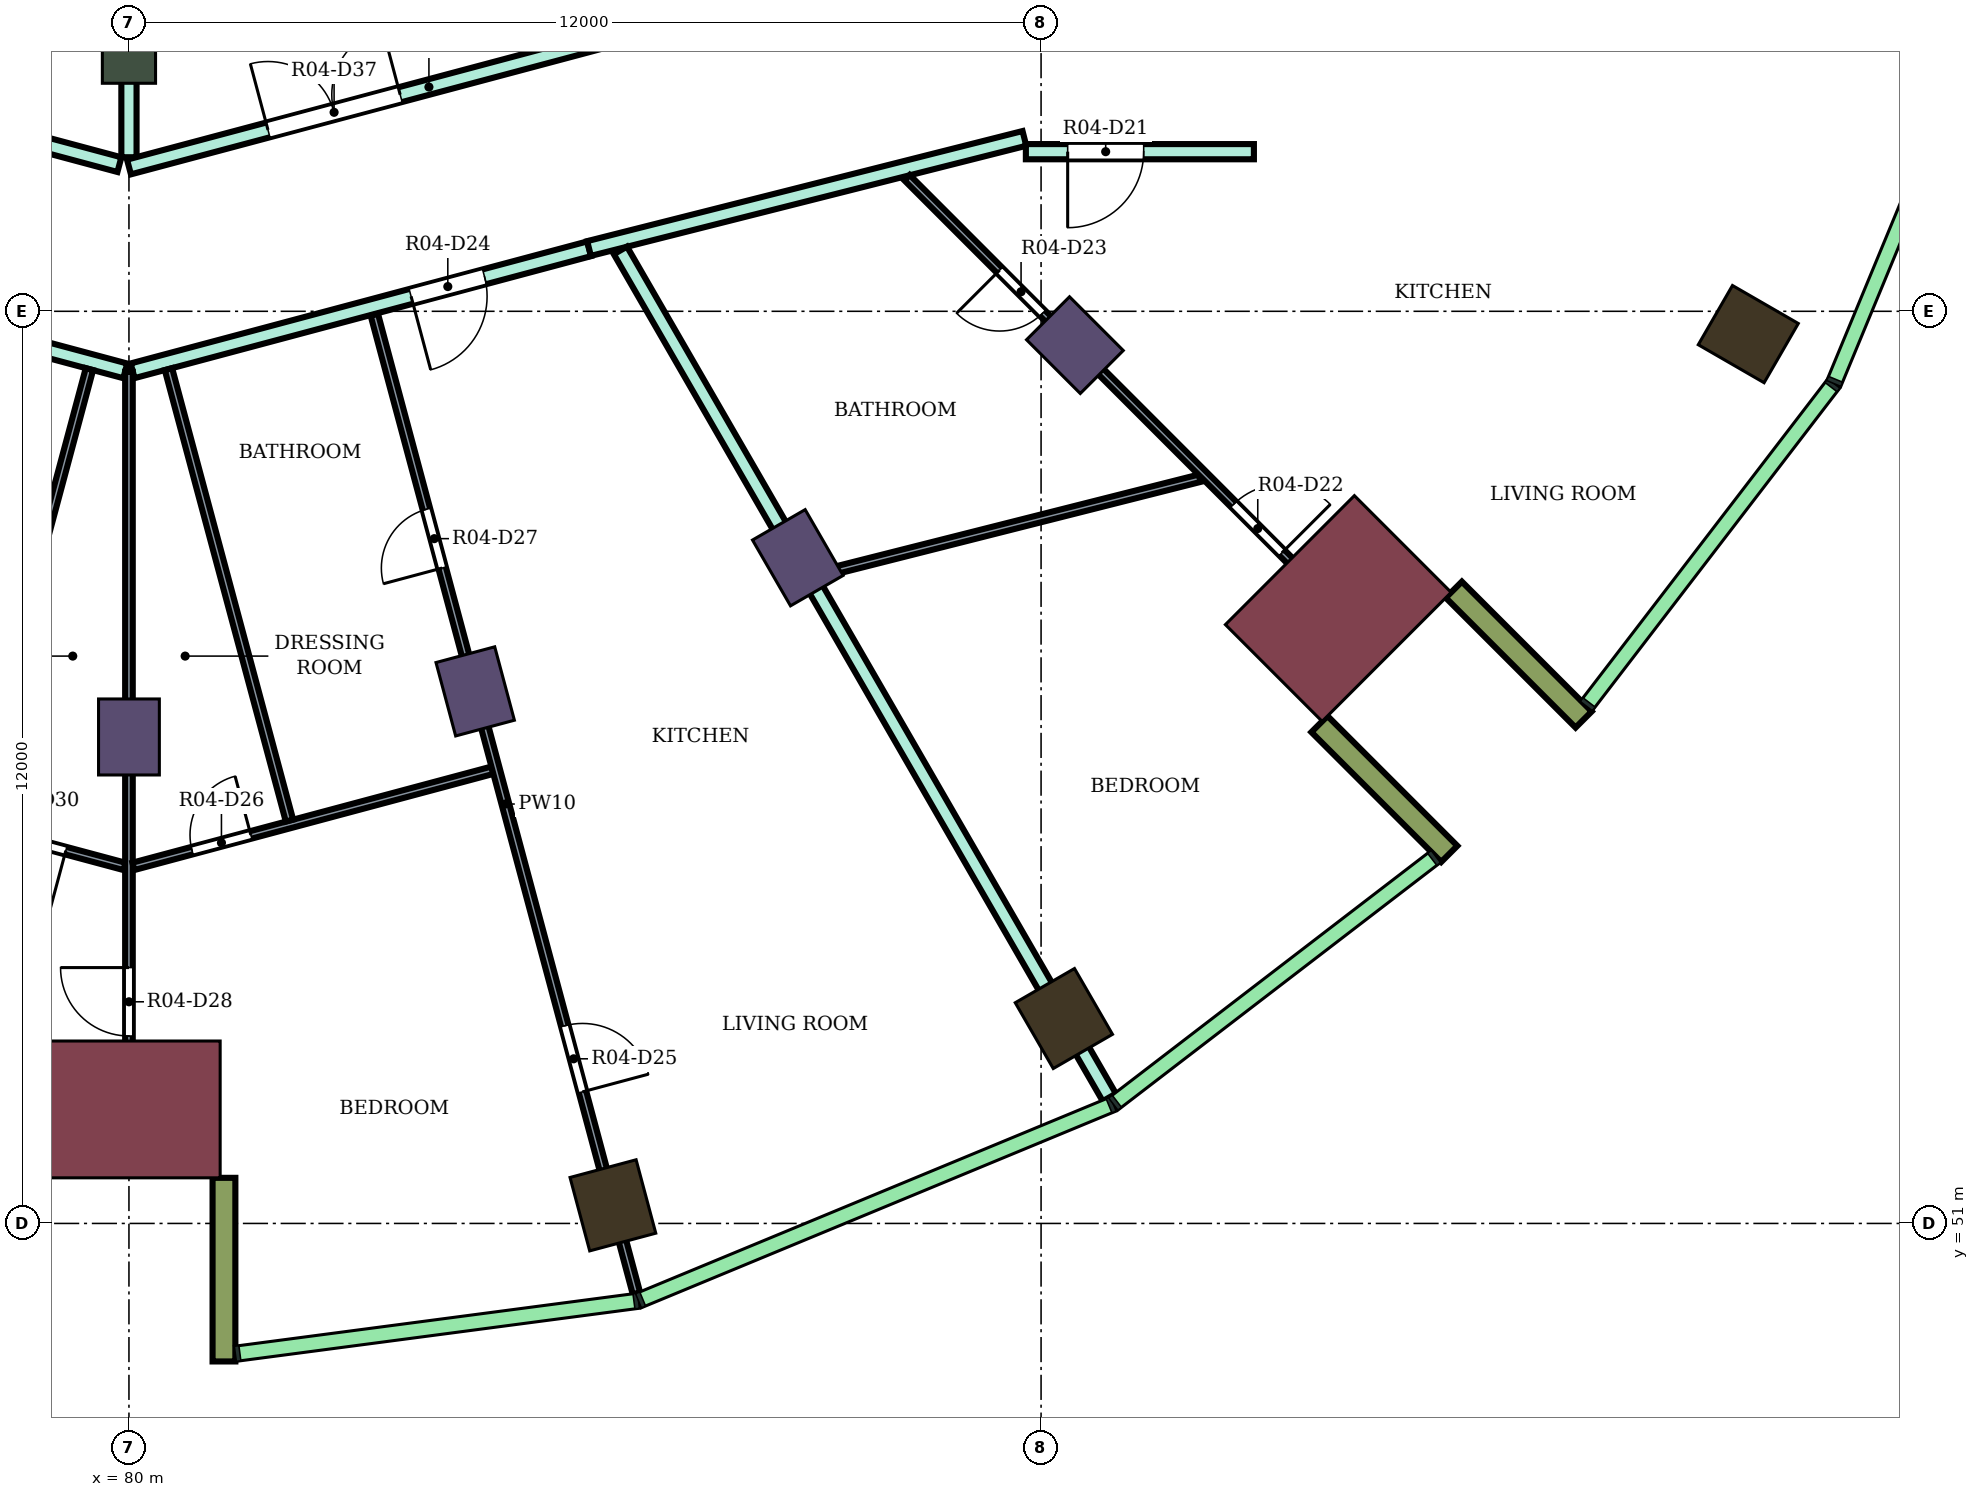
"""IFC4 building model, lengths in metres.
Left out: names, types, materials, properties, quantities, classifications, styles, units other than length and angle.
Written with IfcOpenShell. Run it as: python <this file> out.ifc"""

import sys

from ifc_helpers import new_model, si_unit, direction, frame, frame_2d, origin, origin_2d, place, context, subcontext, project, spatial, rectangle, extrude, element, fill, save


model = new_model("IFC4")
c1 = context("Model", 3, precision=1e-05, world=origin(), true_north=direction((0.0, 1.0)))
c2 = subcontext(c1, "Body", "Model", "MODEL_VIEW")
j1 = project(units=[si_unit("LENGTHUNIT", "METRE"), si_unit("PLANEANGLEUNIT", "RADIAN")], contexts=[c1])
p1 = place(None, origin())
s1 = spatial("IfcSite", under=j1, at=p1, CompositionType="ELEMENT")
p2 = place(p1, origin())
s2 = spatial("IfcBuilding", under=s1, at=p2, CompositionType="ELEMENT")
p3 = place(p2, frame((0.0, 0.0, 202.8)))
s3 = spatial("IfcBuildingStorey", under=s2, at=p3, CompositionType="ELEMENT", Elevation=202.8)
for number, where, z_axis, x_axis in (
    (1, (86.367, 51.238, 0.0), (0.0, 0.0, 1.0), (0.259, -0.966, 0.0)),
    (2, (92.3, 53.696, 0.0), (0.0, 0.0, 1.0), (0.5, -0.866, 0.0)),
    (3, (101.304, 62.7, 0.0), (0.0, 0.0, 1.0), (0.866, -0.5, 0.0)),
):
    element("IfcColumn", number, at=place(p3, frame(where, z_axis=z_axis, x_axis=x_axis)), inside=s3, PredefinedType="COLUMN", context=c2, shape_type="SweptSolid", body=[
        extrude(rectangle(XDim=1.0, YDim=0.9, at=origin_2d()), origin(), (0.0, 0.0, 1.0), 4.1),
    ])
for number, where, z_axis, x_axis in (
    (4, (80.0, 57.4, 0.0), (0.0, 0.0, 1.0), (0.0, -1.0, 0.0)),
    (5, (84.555, 58.0, 0.0), (0.0, 0.0, 1.0), (0.259, -0.966, 0.0)),
    (6, (88.8, 59.758, 0.0), (0.0, 0.0, 1.0), (0.5, -0.866, 0.0)),
    (7, (92.445, 62.555, 0.0), (0.0, 0.0, 1.0), (0.707, -0.707, 0.0)),
):
    element("IfcColumn", number, at=place(p3, frame(where, z_axis=z_axis, x_axis=x_axis)), inside=s3, PredefinedType="COLUMN", context=c2, shape_type="SweptSolid", body=[
        extrude(rectangle(XDim=1.0, YDim=0.8, at=origin_2d()), origin(), (0.0, 0.0, 1.0), 4.1),
    ])
p4 = place(p3, frame((80.0, 66.4, 0.0), z_axis=(0.0, 0.0, 1.0), x_axis=(0.0, -1.0, 0.0)))
e8 = element("IfcColumn", 8, at=p4, inside=s3, PredefinedType="COLUMN", context=c2, shape_type="SweptSolid", body=[
    extrude(rectangle(XDim=0.8, YDim=0.7, at=origin_2d()), origin(), (0.0, 0.0, 1.0), 4.1),
])
for number, where, z_axis, x_axis in (
    (9, (80.0, 52.5, 0.0), (0.0, 0.0, 1.0), (0.0, -1.0, 0.0)),
    (10, (95.91, 59.09, 0.0), (0.0, 0.0, 1.0), (0.707, -0.707, 0.0)),
):
    element("IfcColumn", number, at=place(p3, frame(where, z_axis=z_axis, x_axis=x_axis)), inside=s3, PredefinedType="COLUMN", context=c2, shape_type="SweptSolid", body=[
        extrude(rectangle(XDim=1.8, YDim=2.4, at=origin_2d()), origin(), (0.0, 0.0, 1.0), 4.1),
    ])
for number, where, z_axis, x_axis in (
    (11, (81.25, 51.6, 0.0), (0.0, 0.0, 1.0), (0.0, -1.0, 0.0)),
    (12, (95.662, 57.57, 0.0), (0.0, 0.0, 1.0), (0.707, -0.707, 0.0)),
    (13, (97.43, 59.338, 0.0), (0.0, 0.0, 1.0), (0.707, -0.707, 0.0)),
):
    element("IfcWall", number, at=place(p3, frame(where, z_axis=z_axis, x_axis=x_axis)), inside=s3, PredefinedType="NOTDEFINED", context=c2, shape_type="SweptSolid", body=[
        extrude(rectangle(XDim=2.416, YDim=0.3, at=frame_2d((1.208, 0.0))), origin(), (0.0, 0.0, 1.0), 4.1),
    ])
p5 = place(p3, frame((73.947, 63.826, 0.0), z_axis=(0.0, 0.0, 1.0), x_axis=(0.965908253407, -0.258884619088, 0.0)))
e14 = element("IfcWall", 14, at=p5, inside=s3, PredefinedType="PARTITIONING", context=c2, shape_type="SweptSolid", body=[
    extrude(rectangle(XDim=6.217, YDim=0.2, at=frame_2d((3.108, 0.0))), origin(), (0.0, 0.0, 1.0), 3.65),
])
p6 = place(p5, frame((1.424, 0.0, 0.0)))
e15 = element("IfcOpeningElement", 15, at=p6, cuts=e14, PredefinedType="OPENING", context=c2, shape_type="SweptSolid", body=[
    extrude(rectangle(XDim=1.0, YDim=2.1, at=frame_2d((0.5, 1.05))), frame((0.0, 0.11, 0.0), z_axis=(0.0, -1.0, 0.0), x_axis=(1.0, 0.0, 0.0)), (0.0, 0.0, 1.0), 0.22),
])
p7 = place(p3, frame((74.603, 66.342, 0.0), z_axis=(0.0, 0.0, 1.0), x_axis=(0.965920893652, -0.258837453254, 0.0)))
e16 = element("IfcWall", 16, at=p7, inside=s3, PredefinedType="PARTITIONING", context=c2, shape_type="SweptSolid", body=[
    extrude(rectangle(XDim=5.458, YDim=0.2, at=frame_2d((2.729, 0.0))), origin(), (0.0, 0.0, 1.0), 3.65),
])
p8 = place(p7, frame((2.512, 0.0, 0.0)))
e17 = element("IfcOpeningElement", 17, at=p8, cuts=e16, PredefinedType="OPENING", context=c2, shape_type="SweptSolid", body=[
    extrude(rectangle(XDim=0.9, YDim=2.1, at=frame_2d((0.45, 1.05))), frame((0.0, 0.11, 0.0), z_axis=(0.0, -1.0, 0.0), x_axis=(1.0, 0.0, 0.0)), (0.0, 0.0, 1.0), 0.22),
])
p9 = place(p3, frame((80.048, 62.217, 0.0), z_axis=(0.0, 0.0, 1.0), x_axis=(0.966097920642, 0.258175923996, 0.0)))
e18 = element("IfcWall", 18, at=p9, inside=s3, PredefinedType="PARTITIONING", context=c2, shape_type="SweptSolid", body=[
    extrude(rectangle(XDim=6.217, YDim=0.2, at=frame_2d((3.108, 0.0))), origin(), (0.0, 0.0, 1.0), 3.65),
])
p10 = place(p9, frame((3.792, 0.0, 0.0)))
e19 = element("IfcOpeningElement", 19, at=p10, cuts=e18, PredefinedType="OPENING", context=c2, shape_type="SweptSolid", body=[
    extrude(rectangle(XDim=1.0, YDim=2.1, at=frame_2d((0.5, 1.05))), frame((0.0, 0.11, 0.0), z_axis=(0.0, -1.0, 0.0), x_axis=(1.0, 0.0, 0.0)), (0.0, 0.0, 1.0), 0.22),
])
p11 = place(p3, frame((80.0, 65.027, 0.0), z_axis=(0.0, 0.0, 1.0), x_axis=(0.0, 1.0, 0.0)))
e20 = element("IfcWall", 20, at=p11, inside=s3, PredefinedType="PARTITIONING", context=c2, shape_type="SweptSolid", body=[
    extrude(rectangle(XDim=2.273, YDim=0.2, at=frame_2d((1.136, 0.0))), origin(), (0.0, 0.0, 1.0), 3.65),
])
p12 = place(p3, frame((80.0, 64.898, 0.0), z_axis=(0.0, 0.0, 1.0), x_axis=(0.966236923997, 0.25765520896, 0.0)))
e21 = element("IfcWall", 21, at=p12, inside=s3, PredefinedType="PARTITIONING", context=c2, shape_type="SweptSolid", body=[
    extrude(rectangle(XDim=8.168, YDim=0.2, at=frame_2d((4.084, 0.0))), origin(), (0.0, 0.0, 1.0), 3.65),
])
p13 = place(p12, frame((1.893, 0.0, 0.0)))
e22 = element("IfcOpeningElement", 22, at=p13, cuts=e21, PredefinedType="OPENING", context=c2, shape_type="SweptSolid", body=[
    extrude(rectangle(XDim=1.8, YDim=2.1, at=frame_2d((0.9, 1.05))), frame((0.0, 0.11, 0.0), z_axis=(0.0, -1.0, 0.0), x_axis=(1.0, 0.0, 0.0)), (0.0, 0.0, 1.0), 0.22),
])
p14 = place(p3, frame((86.053, 63.826, 0.0), z_axis=(0.0, 0.0, 1.0), x_axis=(0.969490004987, 0.245130843083, 0.0)))
e23 = element("IfcWall", 23, at=p14, inside=s3, PredefinedType="PARTITIONING", context=c2, shape_type="SweptSolid", body=[
    extrude(rectangle(XDim=5.908, YDim=0.2, at=frame_2d((2.954, 0.0))), origin(), (0.0, 0.0, 1.0), 3.65),
])
p15 = place(p3, frame((86.466, 63.801, 0.0), z_axis=(0.0, 0.0, 1.0), x_axis=(0.499937082171, -0.866061726362, 0.0)))
e24 = element("IfcWall", 24, at=p15, inside=s3, PredefinedType="PARTITIONING", context=c2, shape_type="SweptSolid", body=[
    extrude(rectangle(XDim=12.866, YDim=0.2, at=frame_2d((6.433, 0.0))), origin(), (0.0, 0.0, 1.0), 3.65),
])
p16 = place(p3, frame((91.8, 65.1, 0.0), z_axis=(0.0, 0.0, 1.0), x_axis=(1.0, 0.0, 0.0)))
e25 = element("IfcWall", 25, at=p16, inside=s3, PredefinedType="PARTITIONING", context=c2, shape_type="SweptSolid", body=[
    extrude(rectangle(XDim=3.0, YDim=0.2, at=frame_2d((1.5, 0.0))), origin(), (0.0, 0.0, 1.0), 3.65),
])
p17 = place(p16, frame((0.55, 0.0, 0.0)))
e26 = element("IfcOpeningElement", 26, at=p17, cuts=e25, PredefinedType="OPENING", context=c2, shape_type="SweptSolid", body=[
    extrude(rectangle(XDim=1.0, YDim=2.1, at=frame_2d((0.5, 1.05))), frame((0.0, 0.11, 0.0), z_axis=(0.0, -1.0, 0.0), x_axis=(1.0, 0.0, 0.0)), (0.0, 0.0, 1.0), 0.22),
])
p18 = place(p3, frame((75.267, 56.95, 0.0), z_axis=(0.0, 0.0, 1.0), x_axis=(0.965900084933, -0.25891509405, 0.0)))
e27 = element("IfcWall", 27, at=p18, inside=s3, PredefinedType="PARTITIONING", context=c2, shape_type="SweptSolid", body=[
    extrude(rectangle(XDim=4.84, YDim=0.1, at=frame_2d((2.42, 0.0))), origin(), (0.0, 0.0, 1.0), 3.65),
])
p19 = place(p18, frame((0.91, 0.0, 0.0)))
e28 = element("IfcOpeningElement", 28, at=p19, cuts=e27, PredefinedType="OPENING", context=c2, shape_type="SweptSolid", body=[
    extrude(rectangle(XDim=0.8, YDim=2.1, at=frame_2d((0.4, 1.05))), frame((0.0, 0.06, 0.0), z_axis=(0.0, -1.0, 0.0), x_axis=(1.0, 0.0, 0.0)), (0.0, 0.0, 1.0), 0.12),
])
p20 = place(p18, frame((3.24, 0.0, 0.0)))
e29 = element("IfcOpeningElement", 29, at=p20, cuts=e27, PredefinedType="OPENING", context=c2, shape_type="SweptSolid", body=[
    extrude(rectangle(XDim=0.8, YDim=2.1, at=frame_2d((0.4, 1.05))), frame((0.0, 0.06, 0.0), z_axis=(0.0, -1.0, 0.0), x_axis=(1.0, 0.0, 0.0)), (0.0, 0.0, 1.0), 0.12),
])
p21 = place(p3, frame((77.888, 56.3, 0.0), z_axis=(0.0, 0.0, 1.0), x_axis=(0.258885575383, 0.965907997098, 0.0)))
e30 = element("IfcWall", 30, at=p21, inside=s3, PredefinedType="PARTITIONING", context=c2, shape_type="SweptSolid", body=[
    extrude(rectangle(XDim=6.15, YDim=0.1, at=frame_2d((3.075, 0.0))), origin(), (0.0, 0.0, 1.0), 3.65),
])
p22 = place(p3, frame((80.0, 51.8, 0.0), z_axis=(0.0, 0.0, 1.0), x_axis=(0.0, 1.0, 0.0)))
e31 = element("IfcWall", 31, at=p22, inside=s3, PredefinedType="PARTITIONING", context=c2, shape_type="SweptSolid", body=[
    extrude(rectangle(XDim=10.404, YDim=0.1, at=frame_2d((5.202, 0.0))), origin(), (0.0, 0.0, 1.0), 3.65),
])
p23 = place(p22, frame((1.666, 0.0, 0.0)))
e32 = element("IfcOpeningElement", 32, at=p23, cuts=e31, PredefinedType="OPENING", context=c2, shape_type="SweptSolid", body=[
    extrude(rectangle(XDim=0.9, YDim=2.1, at=frame_2d((0.45, 1.05))), frame((0.0, 0.06, 0.0), z_axis=(0.0, -1.0, 0.0), x_axis=(1.0, 0.0, 0.0)), (0.0, 0.0, 1.0), 0.12),
])
p24 = place(p3, frame((80.058, 55.698, 0.0), z_axis=(0.0, 0.0, 1.0), x_axis=(0.965970105839, 0.258653734992, 0.0)))
e33 = element("IfcWall", 33, at=p24, inside=s3, PredefinedType="PARTITIONING", context=c2, shape_type="SweptSolid", body=[
    extrude(rectangle(XDim=4.89, YDim=0.1, at=frame_2d((2.445, 0.0))), origin(), (0.0, 0.0, 1.0), 3.65),
])
p25 = place(p24, frame((0.8, 0.0, 0.0)))
e34 = element("IfcOpeningElement", 34, at=p25, cuts=e33, PredefinedType="OPENING", context=c2, shape_type="SweptSolid", body=[
    extrude(rectangle(XDim=0.8, YDim=2.1, at=frame_2d((0.4, 1.05))), frame((0.0, 0.06, 0.0), z_axis=(0.0, -1.0, 0.0), x_axis=(1.0, 0.0, 0.0)), (0.0, 0.0, 1.0), 0.12),
])
p26 = place(p3, frame((80.52, 62.24, 0.0), z_axis=(0.0, 0.0, 1.0), x_axis=(0.258885575383, -0.965907997098, 0.0)))
e35 = element("IfcWall", 35, at=p26, inside=s3, PredefinedType="PARTITIONING", context=c2, shape_type="SweptSolid", body=[
    extrude(rectangle(XDim=6.15, YDim=0.1, at=frame_2d((3.075, 0.0))), origin(), (0.0, 0.0, 1.0), 3.65),
])
p27 = place(p3, frame((83.228, 62.955, 0.0), z_axis=(0.0, 0.0, 1.0), x_axis=(0.258737611245, -0.965947642746, 0.0)))
e36 = element("IfcWall", 36, at=p27, inside=s3, PredefinedType="PARTITIONING", context=c2, shape_type="SweptSolid", body=[
    extrude(rectangle(XDim=13.328, YDim=0.1, at=frame_2d((6.664, 0.0))), origin(), (0.0, 0.0, 1.0), 3.65),
])
p28 = place(p27, frame((9.684, 0.0, 0.0)))
e37 = element("IfcOpeningElement", 37, at=p28, cuts=e36, PredefinedType="OPENING", context=c2, shape_type="SweptSolid", body=[
    extrude(rectangle(XDim=0.9, YDim=2.1, at=frame_2d((0.45, 1.05))), frame((0.0, 0.06, 0.0), z_axis=(0.0, -1.0, 0.0), x_axis=(1.0, 0.0, 0.0)), (0.0, 0.0, 1.0), 0.12),
])
p29 = place(p27, frame((2.65, 0.0, 0.0)))
e38 = element("IfcOpeningElement", 38, at=p29, cuts=e36, PredefinedType="OPENING", context=c2, shape_type="SweptSolid", body=[
    extrude(rectangle(XDim=0.8, YDim=2.1, at=frame_2d((0.4, 1.05))), frame((0.0, 0.06, 0.0), z_axis=(0.0, -1.0, 0.0), x_axis=(1.0, 0.0, 0.0)), (0.0, 0.0, 1.0), 0.12),
])
p30 = place(p3, frame((89.054, 59.531, 0.0), z_axis=(0.0, 0.0, 1.0), x_axis=(0.969472150829, 0.245201445279, 0.0)))
e39 = element("IfcWall", 39, at=p30, inside=s3, PredefinedType="PARTITIONING", context=c2, shape_type="SweptSolid", body=[
    extrude(rectangle(XDim=5.191, YDim=0.1, at=frame_2d((2.596, 0.0))), origin(), (0.0, 0.0, 1.0), 3.65),
])
p31 = place(p3, frame((90.236, 64.758, 0.0), z_axis=(0.0, 0.0, 1.0), x_axis=(0.706952774706, -0.707260754132, 0.0)))
e40 = element("IfcWall", 40, at=p31, inside=s3, PredefinedType="PARTITIONING", context=c2, shape_type="SweptSolid", body=[
    extrude(rectangle(XDim=8.72, YDim=0.1, at=frame_2d((4.36, 0.0))), origin(), (0.0, 0.0, 1.0), 3.65),
])
p32 = place(p31, frame((6.077, 0.0, 0.0)))
e41 = element("IfcOpeningElement", 41, at=p32, cuts=e40, PredefinedType="OPENING", context=c2, shape_type="SweptSolid", body=[
    extrude(rectangle(XDim=0.9, YDim=2.1, at=frame_2d((0.45, 1.05))), frame((0.0, 0.06, 0.0), z_axis=(0.0, -1.0, 0.0), x_axis=(1.0, 0.0, 0.0)), (0.0, 0.0, 1.0), 0.12),
])
p33 = place(p31, frame((1.722, 0.0, 0.0)))
e42 = element("IfcOpeningElement", 42, at=p33, cuts=e40, PredefinedType="OPENING", context=c2, shape_type="SweptSolid", body=[
    extrude(rectangle(XDim=0.8, YDim=2.1, at=frame_2d((0.4, 1.05))), frame((0.0, 0.06, 0.0), z_axis=(0.0, -1.0, 0.0), x_axis=(1.0, 0.0, 0.0)), (0.0, 0.0, 1.0), 0.12),
])
p34 = place(p17, frame((1.0, 0.0, 0.0), z_axis=(0.0, 0.0, 1.0), x_axis=(-1.0, 0.0, 0.0)))
e43 = element("IfcDoor", 43, at=p34, inside=s3, OperationType="SINGLE_SWING_RIGHT", PredefinedType="DOOR", context=c2, shape_type="SweptSolid", body=[
    extrude(rectangle(XDim=1.0, YDim=2.1, at=frame_2d((0.5, 1.05))), frame((0.0, 0.025, 0.0), z_axis=(0.0, -1.0, 0.0), x_axis=(1.0, 0.0, 0.0)), (0.0, 0.0, 1.0), 0.05),
])
fill(e26, e43)
p35 = place(p32, origin())
e44 = element("IfcDoor", 44, at=p35, inside=s3, OperationType="SINGLE_SWING_RIGHT", PredefinedType="DOOR", context=c2, shape_type="SweptSolid", body=[
    extrude(rectangle(XDim=0.9, YDim=2.1, at=frame_2d((0.45, 1.05))), frame((0.0, 0.025, 0.0), z_axis=(0.0, -1.0, 0.0), x_axis=(1.0, 0.0, 0.0)), (0.0, 0.0, 1.0), 0.05),
])
fill(e41, e44)
p36 = place(p33, frame((0.8, 0.0, 0.0), z_axis=(0.0, 0.0, 1.0), x_axis=(-1.0, 0.0, 0.0)))
e45 = element("IfcDoor", 45, at=p36, inside=s3, OperationType="SINGLE_SWING_RIGHT", PredefinedType="DOOR", context=c2, shape_type="SweptSolid", body=[
    extrude(rectangle(XDim=0.8, YDim=2.1, at=frame_2d((0.4, 1.05))), frame((0.0, 0.025, 0.0), z_axis=(0.0, -1.0, 0.0), x_axis=(1.0, 0.0, 0.0)), (0.0, 0.0, 1.0), 0.05),
])
fill(e42, e45)
p37 = place(p10, frame((1.0, 0.0, 0.0), z_axis=(0.0, 0.0, 1.0), x_axis=(-1.0, 0.0, 0.0)))
e46 = element("IfcDoor", 46, at=p37, inside=s3, OperationType="SINGLE_SWING_RIGHT", PredefinedType="DOOR", context=c2, shape_type="SweptSolid", body=[
    extrude(rectangle(XDim=1.0, YDim=2.1, at=frame_2d((0.5, 1.05))), frame((0.0, 0.025, 0.0), z_axis=(0.0, -1.0, 0.0), x_axis=(1.0, 0.0, 0.0)), (0.0, 0.0, 1.0), 0.05),
])
fill(e19, e46)
p38 = place(p28, origin())
e47 = element("IfcDoor", 47, at=p38, inside=s3, OperationType="SINGLE_SWING_RIGHT", PredefinedType="DOOR", context=c2, shape_type="SweptSolid", body=[
    extrude(rectangle(XDim=0.9, YDim=2.1, at=frame_2d((0.45, 1.05))), frame((0.0, 0.025, 0.0), z_axis=(0.0, -1.0, 0.0), x_axis=(1.0, 0.0, 0.0)), (0.0, 0.0, 1.0), 0.05),
])
fill(e37, e47)
p39 = place(p25, origin())
e48 = element("IfcDoor", 48, at=p39, inside=s3, OperationType="SINGLE_SWING_RIGHT", PredefinedType="DOOR", context=c2, shape_type="SweptSolid", body=[
    extrude(rectangle(XDim=0.8, YDim=2.1, at=frame_2d((0.4, 1.05))), frame((0.0, 0.025, 0.0), z_axis=(0.0, -1.0, 0.0), x_axis=(1.0, 0.0, 0.0)), (0.0, 0.0, 1.0), 0.05),
])
fill(e34, e48)
p40 = place(p29, frame((0.8, 0.0, 0.0), z_axis=(0.0, 0.0, 1.0), x_axis=(-1.0, 0.0, 0.0)))
e49 = element("IfcDoor", 49, at=p40, inside=s3, OperationType="SINGLE_SWING_LEFT", PredefinedType="DOOR", context=c2, shape_type="SweptSolid", body=[
    extrude(rectangle(XDim=0.8, YDim=2.1, at=frame_2d((0.4, 1.05))), frame((0.0, 0.025, 0.0), z_axis=(0.0, -1.0, 0.0), x_axis=(1.0, 0.0, 0.0)), (0.0, 0.0, 1.0), 0.05),
])
fill(e38, e49)
p41 = place(p23, origin())
e50 = element("IfcDoor", 50, at=p41, inside=s3, OperationType="SINGLE_SWING_RIGHT", PredefinedType="DOOR", context=c2, shape_type="SweptSolid", body=[
    extrude(rectangle(XDim=0.9, YDim=2.1, at=frame_2d((0.45, 1.05))), frame((0.0, 0.025, 0.0), z_axis=(0.0, -1.0, 0.0), x_axis=(1.0, 0.0, 0.0)), (0.0, 0.0, 1.0), 0.05),
])
fill(e32, e50)
p42 = place(p20, frame((0.8, 0.0, 0.0), z_axis=(0.0, 0.0, 1.0), x_axis=(-1.0, 0.0, 0.0)))
e51 = element("IfcDoor", 51, at=p42, inside=s3, OperationType="SINGLE_SWING_LEFT", PredefinedType="DOOR", context=c2, shape_type="SweptSolid", body=[
    extrude(rectangle(XDim=0.8, YDim=2.1, at=frame_2d((0.4, 1.05))), frame((0.0, 0.025, 0.0), z_axis=(0.0, -1.0, 0.0), x_axis=(1.0, 0.0, 0.0)), (0.0, 0.0, 1.0), 0.05),
])
fill(e29, e51)
p43 = place(p13, origin())
e52 = element("IfcDoor", 52, at=p43, inside=s3, OperationType="DOUBLE_DOOR_SINGLE_SWING", PredefinedType="DOOR", context=c2, shape_type="SweptSolid", body=[
    extrude(rectangle(XDim=1.8, YDim=2.1, at=frame_2d((0.9, 1.05))), frame((0.0, 0.025, 0.0), z_axis=(0.0, -1.0, 0.0), x_axis=(1.0, 0.0, 0.0)), (0.0, 0.0, 1.0), 0.05),
])
fill(e22, e52)
save(model, sys.argv[1])
